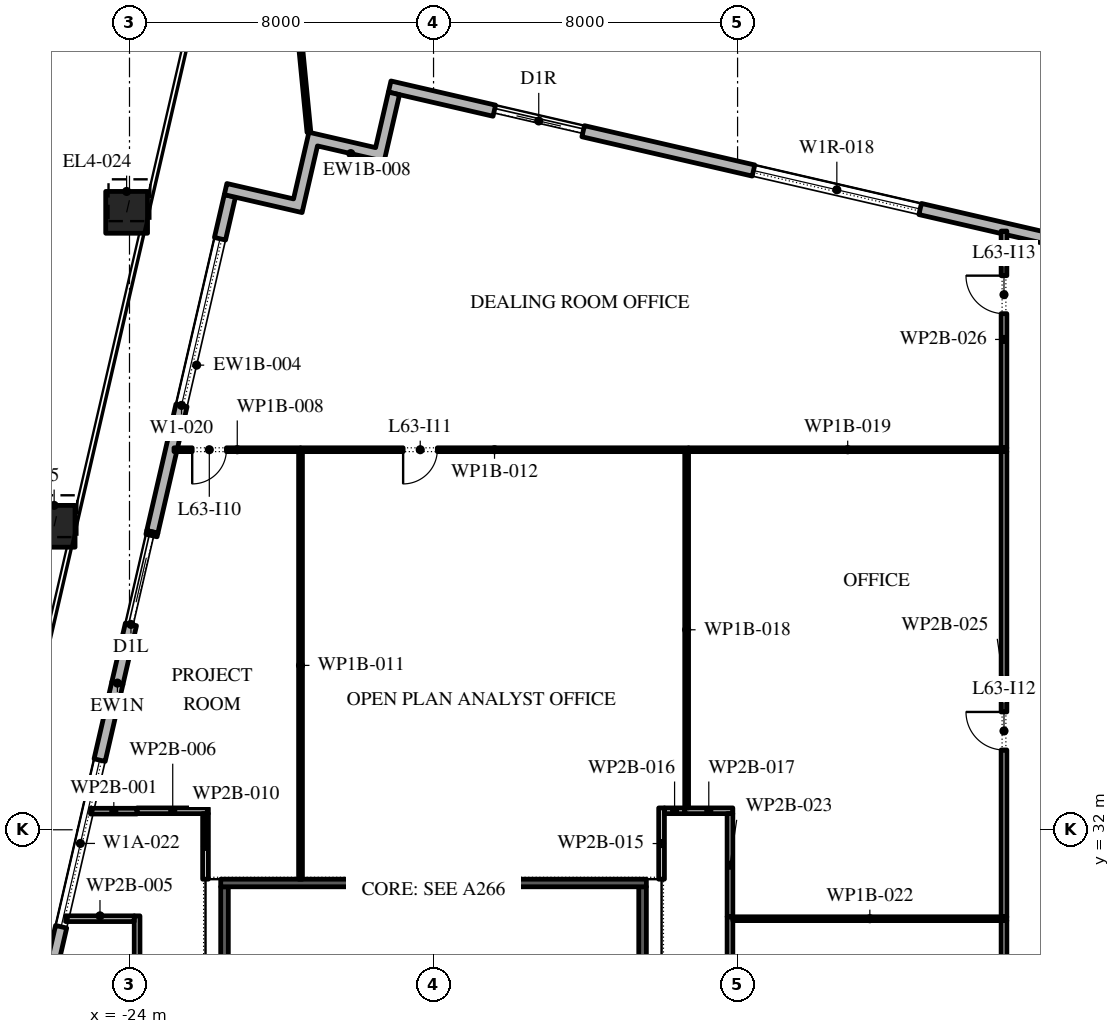
"""IFC4 building model, lengths in metres.
Left out: names, types, materials, properties, quantities, classifications, styles, units other than length and angle.
Written with IfcOpenShell. Run it as: python <this file> out.ifc"""

import sys

from ifc_helpers import new_model, si_unit, direction, frame, frame_2d, origin, origin_2d, place, context, subcontext, project, spatial, polyline, rectangle, outline, extrude, element, fill, save


model = new_model("IFC4")
c1 = context("Model", 3, precision=1e-05, world=origin(), true_north=direction((0.0, 1.0)))
c2 = subcontext(c1, "Body", "Model", "MODEL_VIEW")
j1 = project(units=[si_unit("LENGTHUNIT", "METRE"), si_unit("PLANEANGLEUNIT", "RADIAN")], contexts=[c1])
p1 = place(None, origin())
s1 = spatial("IfcSite", under=j1, at=p1, CompositionType="ELEMENT")
p2 = place(p1, origin())
s2 = spatial("IfcBuilding", under=s1, at=p2, CompositionType="ELEMENT")
p3 = place(p2, frame((0.0, 0.0, 289.2)))
s3 = spatial("IfcBuildingStorey", under=s2, at=p3, CompositionType="ELEMENT", Elevation=289.2)
p4 = place(p3, frame((-24.076, 48.246, 0.0), z_axis=(0.017444089556, 0.075687644385, 0.996978978829), x_axis=(-0.974454034257, 0.224587032398, 0.0)))
e1 = element("IfcColumn", 1, at=p4, inside=s3, PredefinedType="COLUMN", context=c2, shape_type="SweptSolid", body=[
    extrude(rectangle(XDim=1.1, YDim=1.1, at=origin_2d()), origin(), (0.0, 0.0, 1.0), 4.213),
])
p5 = place(p3, frame((-25.983, 39.985, 0.0), z_axis=(0.014617783326, 0.063169706518, 0.99789574034), x_axis=(-0.974255315496, 0.225447511024, 0.0)))
e2 = element("IfcColumn", 2, at=p5, inside=s3, PredefinedType="COLUMN", context=c2, shape_type="SweptSolid", body=[
    extrude(rectangle(XDim=1.1, YDim=1.1, at=origin_2d()), origin(), (0.0, 0.0, 1.0), 4.209),
])
p6 = place(p3, frame((29.616, 40.758, 0.0), z_axis=(0.0, 0.0, 1.0), x_axis=(-0.974370532314, 0.224949029246, 0.0)))
e3 = element("IfcWall", 3, at=p6, inside=s3, PredefinedType="STANDARD", context=c2, shape_type="SweptSolid", body=[
    extrude(rectangle(XDim=48.0, YDim=0.3, at=frame_2d((24.0, 0.0))), origin(), (0.0, 0.0, 1.0), 3.95),
])
p7 = place(p6, frame((1.625, 0.0, 0.45)))
e4 = element("IfcOpeningElement", 4, at=p7, cuts=e3, PredefinedType="OPENING", context=c2, shape_type="SweptSolid", body=[
    extrude(rectangle(XDim=4.5, YDim=2.475, at=frame_2d((2.25, 1.238))), frame((0.0, 0.16, 0.0), z_axis=(0.0, -1.0, 0.0), x_axis=(1.0, 0.0, 0.0)), (0.0, 0.0, 1.0), 0.32),
])
p8 = place(p6, frame((10.575, 0.0, 0.0)))
e5 = element("IfcOpeningElement", 5, at=p8, cuts=e3, PredefinedType="OPENING", context=c2, shape_type="SweptSolid", body=[
    extrude(rectangle(XDim=2.4, YDim=3.5, at=frame_2d((1.2, 1.75))), frame((0.0, 0.16, 0.0), z_axis=(0.0, -1.0, 0.0), x_axis=(1.0, 0.0, 0.0)), (0.0, 0.0, 1.0), 0.32),
])
p9 = place(p6, frame((17.575, 0.0, 0.45)))
e6 = element("IfcOpeningElement", 6, at=p9, cuts=e3, PredefinedType="OPENING", context=c2, shape_type="SweptSolid", body=[
    extrude(rectangle(XDim=4.5, YDim=2.4, at=frame_2d((2.25, 1.2))), frame((0.0, 0.16, 0.0), z_axis=(0.0, -1.0, 0.0), x_axis=(1.0, 0.0, 0.0)), (0.0, 0.0, 1.0), 0.32),
])
p10 = place(p6, frame((25.625, 0.0, 0.45)))
e7 = element("IfcOpeningElement", 7, at=p10, cuts=e3, PredefinedType="OPENING", context=c2, shape_type="SweptSolid", body=[
    extrude(rectangle(XDim=4.5, YDim=2.4, at=frame_2d((2.25, 1.2))), frame((0.0, 0.16, 0.0), z_axis=(0.0, -1.0, 0.0), x_axis=(1.0, 0.0, 0.0)), (0.0, 0.0, 1.0), 0.32),
])
p11 = place(p6, frame((33.675, 0.0, 0.45)))
e8 = element("IfcOpeningElement", 8, at=p11, cuts=e3, PredefinedType="OPENING", context=c2, shape_type="SweptSolid", body=[
    extrude(rectangle(XDim=4.5, YDim=2.4, at=frame_2d((2.25, 1.2))), frame((0.0, 0.16, 0.0), z_axis=(0.0, -1.0, 0.0), x_axis=(1.0, 0.0, 0.0)), (0.0, 0.0, 1.0), 0.32),
])
p12 = place(p6, frame((42.775, 0.0, 0.0)))
e9 = element("IfcOpeningElement", 9, at=p12, cuts=e3, PredefinedType="OPENING", context=c2, shape_type="SweptSolid", body=[
    extrude(rectangle(XDim=2.4, YDim=2.85, at=frame_2d((1.2, 1.425))), frame((0.0, 0.16, 0.0), z_axis=(0.0, -1.0, 0.0), x_axis=(1.0, 0.0, 0.0)), (0.0, 0.0, 1.0), 0.32),
])
p13 = place(p3, frame((-21.359, 48.678, 0.0), z_axis=(0.0, 0.0, 1.0), x_axis=(-0.224942060428, -0.974372141151, 0.0)))
e10 = element("IfcWall", 10, at=p13, inside=s3, PredefinedType="STANDARD", context=c2, shape_type="SweptSolid", body=[
    extrude(rectangle(XDim=9.071, YDim=0.3, at=frame_2d((4.536, 0.0))), origin(), (0.0, 0.0, 1.0), 3.95),
])
p14 = place(p13, frame((1.157, 0.0, 0.45)))
e11 = element("IfcOpeningElement", 11, at=p14, cuts=e10, PredefinedType="OPENING", context=c2, shape_type="SweptSolid", body=[
    extrude(rectangle(XDim=4.5, YDim=3.05, at=frame_2d((2.25, 1.525))), frame((0.0, 0.16, 0.0), z_axis=(0.0, -1.0, 0.0), x_axis=(1.0, 0.0, 0.0)), (0.0, 0.0, 1.0), 0.32),
])
p15 = place(p3, origin())
e12 = element("IfcWall", 12, at=p15, inside=s3, PredefinedType="STANDARD", context=c2, shape_type="SweptSolid", body=[
    extrude(outline(polyline([(-21.505, 48.712), (-21.438, 49.004), (-19.684, 48.599), (-19.279, 50.353), (-17.525, 49.948), (-17.188, 51.41), (-16.895, 51.342), (-17.3, 49.588), (-19.054, 49.993), (-19.459, 48.24), (-21.505, 48.712)])), origin(), (0.0, 0.0, 1.0), 3.95),
])
p16 = place(p3, frame((-19.279, 50.353, -0.05), z_axis=(0.0, 0.0, 1.0), x_axis=(-0.096971312153, 0.995287176959, 0.0)))
e13 = element("IfcWall", 13, at=p16, inside=s3, PredefinedType="STANDARD", context=c2, shape_type="SweptSolid", body=[
    extrude(rectangle(XDim=6.74, YDim=0.1, at=frame_2d((3.37, 0.0))), origin(), (0.0, 0.0, 1.0), 4.0),
])
p17 = place(p3, frame((-21.5, 25.75, 0.0), z_axis=(0.0, 0.0, 1.0), x_axis=(0.0, 1.0, 0.0)))
e14 = element("IfcWall", 14, at=p17, inside=s3, PredefinedType="SHEAR", context=c2, shape_type="SweptSolid", body=[
    extrude(rectangle(XDim=4.75, YDim=0.2, at=frame_2d((2.375, 0.0))), origin(), (0.0, 0.0, 1.0), 3.95),
])
p18 = place(p3, frame((-10.5, 25.75, 0.0), z_axis=(0.0, 0.0, 1.0), x_axis=(0.0, 1.0, 0.0)))
e15 = element("IfcWall", 15, at=p18, inside=s3, PredefinedType="SHEAR", context=c2, shape_type="SweptSolid", body=[
    extrude(rectangle(XDim=4.75, YDim=0.2, at=frame_2d((2.375, 0.0))), origin(), (0.0, 0.0, 1.0), 3.95),
])
p19 = place(p18, frame((1.925, 0.0, 0.0)))
e16 = element("IfcOpeningElement", 16, at=p19, cuts=e15, PredefinedType="OPENING", context=c2, shape_type="SweptSolid", body=[
    extrude(rectangle(XDim=0.9, YDim=2.1, at=frame_2d((0.45, 1.05))), frame((0.0, 0.11, 0.0), z_axis=(0.0, -1.0, 0.0), x_axis=(1.0, 0.0, 0.0)), (0.0, 0.0, 1.0), 0.22),
])
p20 = place(p3, frame((-21.6, 30.6, 0.0), z_axis=(0.0, 0.0, 1.0), x_axis=(1.0, 0.0, 0.0)))
e17 = element("IfcWall", 17, at=p20, inside=s3, PredefinedType="SHEAR", context=c2, shape_type="SweptSolid", body=[
    extrude(rectangle(XDim=11.2, YDim=0.2, at=frame_2d((5.6, 0.0))), origin(), (0.0, 0.0, 1.0), 3.95),
])
p21 = place(p3, frame((-25.025, 32.49, 0.0), z_axis=(0.0, 0.0, 1.0), x_axis=(1.0, 0.0, 0.0)))
e18 = element("IfcWall", 18, at=p21, inside=s3, PredefinedType="PARTITIONING", context=c2, shape_type="SweptSolid", body=[
    extrude(rectangle(XDim=1.225, YDim=0.15, at=frame_2d((0.612, 0.0))), origin(), (0.0, 0.0, 1.0), 3.95),
])
p22 = place(p3, frame((-23.8, 8.86, 0.0), z_axis=(0.0, 0.0, 1.0), x_axis=(0.0, 1.0, 0.0)))
e19 = element("IfcWall", 19, at=p22, inside=s3, PredefinedType="PARTITIONING", context=c2, shape_type="SweptSolid", body=[
    extrude(rectangle(XDim=20.875, YDim=0.15, at=frame_2d((10.438, 0.0))), origin(), (0.0, 0.0, 1.0), 3.95),
])
p23 = place(p22, frame((7.9, 0.0, 0.0)))
e20 = element("IfcOpeningElement", 20, at=p23, cuts=e19, PredefinedType="OPENING", context=c2, shape_type="SweptSolid", body=[
    extrude(rectangle(XDim=1.0, YDim=2.1, at=frame_2d((0.5, 1.05))), frame((0.0, 0.085, 0.0), z_axis=(0.0, -1.0, 0.0), x_axis=(1.0, 0.0, 0.0)), (0.0, 0.0, 1.0), 0.17),
])
p24 = place(p3, frame((-23.875, 29.66, 0.0), z_axis=(0.0, 0.0, 1.0), x_axis=(-1.0, 0.0, 0.0)))
e21 = element("IfcWall", 21, at=p24, inside=s3, PredefinedType="PARTITIONING", context=c2, shape_type="SweptSolid", body=[
    extrude(rectangle(XDim=1.803, YDim=0.15, at=frame_2d((0.901, 0.0))), origin(), (0.0, 0.0, 1.0), 3.95),
])
p25 = place(p3, frame((-23.8, 32.5, 0.0), z_axis=(0.0, 0.0, 1.0), x_axis=(1.0, 0.0, 0.0)))
e22 = element("IfcWall", 22, at=p25, inside=s3, PredefinedType="PARTITIONING", context=c2, shape_type="SweptSolid", body=[
    extrude(rectangle(XDim=1.875, YDim=0.15, at=frame_2d((0.938, 0.0))), origin(), (0.0, 0.0, 1.0), 3.95),
])
p26 = place(p3, frame((-22.829, 42.0, 0.0), z_axis=(0.0, 0.0, 1.0), x_axis=(1.0, 0.0, 0.0)))
e23 = element("IfcWall", 23, at=p26, inside=s3, PredefinedType="PARTITIONING", context=c2, shape_type="SweptSolid", body=[
    extrude(rectangle(XDim=3.329, YDim=0.1, at=frame_2d((1.665, 0.0))), origin(), (0.0, 0.0, 1.0), 3.95),
])
p27 = place(p26, frame((0.479, 0.0, 0.0)))
e24 = element("IfcOpeningElement", 24, at=p27, cuts=e23, PredefinedType="OPENING", context=c2, shape_type="SweptSolid", body=[
    extrude(rectangle(XDim=0.9, YDim=2.1, at=frame_2d((0.45, 1.05))), frame((0.0, 0.06, 0.0), z_axis=(0.0, -1.0, 0.0), x_axis=(1.0, 0.0, 0.0)), (0.0, 0.0, 1.0), 0.12),
])
p28 = place(p3, frame((-22.0, 32.425, 0.0), z_axis=(0.0, 0.0, 1.0), x_axis=(0.0, -1.0, 0.0)))
e25 = element("IfcWall", 25, at=p28, inside=s3, PredefinedType="PARTITIONING", context=c2, shape_type="SweptSolid", body=[
    extrude(rectangle(XDim=1.725, YDim=0.15, at=frame_2d((0.863, 0.0))), origin(), (0.0, 0.0, 1.0), 3.95),
])
p29 = place(p3, frame((-19.5, 41.95, 0.0), z_axis=(0.0, 0.0, 1.0), x_axis=(0.0, -1.0, 0.0)))
e26 = element("IfcWall", 26, at=p29, inside=s3, PredefinedType="PARTITIONING", context=c2, shape_type="SweptSolid", body=[
    extrude(rectangle(XDim=11.25, YDim=0.1, at=frame_2d((5.625, 0.0))), origin(), (0.0, 0.0, 1.0), 3.95),
])
p30 = place(p3, frame((-19.5, 42.0, 0.0), z_axis=(0.0, 0.0, 1.0), x_axis=(1.0, 0.0, 0.0)))
e27 = element("IfcWall", 27, at=p30, inside=s3, PredefinedType="PARTITIONING", context=c2, shape_type="SweptSolid", body=[
    extrude(rectangle(XDim=10.21, YDim=0.1, at=frame_2d((5.105, 0.0))), origin(), (0.0, 0.0, 1.0), 3.95),
])
p31 = place(p30, frame((2.7, 0.0, 0.0)))
e28 = element("IfcOpeningElement", 28, at=p31, cuts=e27, PredefinedType="OPENING", context=c2, shape_type="SweptSolid", body=[
    extrude(rectangle(XDim=0.9, YDim=2.1, at=frame_2d((0.45, 1.05))), frame((0.0, 0.06, 0.0), z_axis=(0.0, -1.0, 0.0), x_axis=(1.0, 0.0, 0.0)), (0.0, 0.0, 1.0), 0.12),
])
p32 = place(p3, frame((-10.0, 30.7, 0.0), z_axis=(0.0, 0.0, 1.0), x_axis=(0.0, 1.0, 0.0)))
e29 = element("IfcWall", 29, at=p32, inside=s3, PredefinedType="PARTITIONING", context=c2, shape_type="SweptSolid", body=[
    extrude(rectangle(XDim=1.875, YDim=0.15, at=frame_2d((0.938, 0.0))), origin(), (0.0, 0.0, 1.0), 3.95),
])
p33 = place(p3, frame((-9.925, 32.5, 0.0), z_axis=(0.0, 0.0, 1.0), x_axis=(1.0, 0.0, 0.0)))
e30 = element("IfcWall", 30, at=p33, inside=s3, PredefinedType="PARTITIONING", context=c2, shape_type="SweptSolid", body=[
    extrude(rectangle(XDim=0.535, YDim=0.15, at=frame_2d((0.268, 0.0))), origin(), (0.0, 0.0, 1.0), 3.95),
])
p34 = place(p3, frame((-9.39, 32.5, 0.0), z_axis=(0.0, 0.0, 1.0), x_axis=(1.0, 0.0, 0.0)))
e31 = element("IfcWall", 31, at=p34, inside=s3, PredefinedType="PARTITIONING", context=c2, shape_type="SweptSolid", body=[
    extrude(rectangle(XDim=1.265, YDim=0.15, at=frame_2d((0.632, 0.0))), origin(), (0.0, 0.0, 1.0), 3.95),
])
p35 = place(p3, frame((-9.34, 41.95, 0.0), z_axis=(0.0, 0.0, 1.0), x_axis=(0.0, -1.0, 0.0)))
e32 = element("IfcWall", 32, at=p35, inside=s3, PredefinedType="PARTITIONING", context=c2, shape_type="SweptSolid", body=[
    extrude(rectangle(XDim=9.375, YDim=0.1, at=frame_2d((4.688, 0.0))), origin(), (0.0, 0.0, 1.0), 3.95),
])
p36 = place(p3, frame((-9.29, 42.0, 0.0), z_axis=(0.0, 0.0, 1.0), x_axis=(1.0, 0.0, 0.0)))
e33 = element("IfcWall", 33, at=p36, inside=s3, PredefinedType="PARTITIONING", context=c2, shape_type="SweptSolid", body=[
    extrude(rectangle(XDim=8.375, YDim=0.1, at=frame_2d((4.188, 0.0))), origin(), (0.0, 0.0, 1.0), 3.95),
])
p37 = place(p3, frame((-8.2, 29.71, 0.0), z_axis=(0.0, 0.0, 1.0), x_axis=(0.0, -1.0, 0.0)))
e34 = element("IfcWall", 34, at=p37, inside=s3, PredefinedType="PARTITIONING", context=c2, shape_type="SweptSolid", body=[
    extrude(rectangle(XDim=10.635, YDim=0.15, at=frame_2d((5.317, 0.0))), origin(), (0.0, 0.0, 1.0), 3.95),
])
p38 = place(p37, frame((2.81, 0.0, 0.0)))
e35 = element("IfcOpeningElement", 35, at=p38, cuts=e34, PredefinedType="OPENING", context=c2, shape_type="SweptSolid", body=[
    extrude(rectangle(XDim=1.0, YDim=2.1, at=frame_2d((0.5, 1.05))), frame((0.0, 0.085, 0.0), z_axis=(0.0, -1.0, 0.0), x_axis=(1.0, 0.0, 0.0)), (0.0, 0.0, 1.0), 0.17),
])
p39 = place(p3, frame((-8.125, 29.66, 0.0), z_axis=(0.0, 0.0, 1.0), x_axis=(1.0, 0.0, 0.0)))
e36 = element("IfcWall", 36, at=p39, inside=s3, PredefinedType="PARTITIONING", context=c2, shape_type="SweptSolid", body=[
    extrude(rectangle(XDim=7.21, YDim=0.1, at=frame_2d((3.605, 0.0))), origin(), (0.0, 0.0, 1.0), 3.95),
])
p40 = place(p3, frame((-8.2, 32.425, 0.0), z_axis=(0.0, 0.0, 1.0), x_axis=(0.0, -1.0, 0.0)))
e37 = element("IfcWall", 37, at=p40, inside=s3, PredefinedType="PARTITIONING", context=c2, shape_type="SweptSolid", body=[
    extrude(rectangle(XDim=2.715, YDim=0.15, at=frame_2d((1.357, 0.0))), origin(), (0.0, 0.0, 1.0), 3.95),
])
p41 = place(p3, frame((-0.99, 19.075, 0.0), z_axis=(0.0, 0.0, 1.0), x_axis=(0.0, 1.0, 0.0)))
e38 = element("IfcWall", 38, at=p41, inside=s3, PredefinedType="PARTITIONING", context=c2, shape_type="SweptSolid", body=[
    extrude(rectangle(XDim=10.535, YDim=0.15, at=frame_2d((5.268, 0.0))), origin(), (0.0, 0.0, 1.0), 3.95),
])
p42 = place(p3, frame((-0.99, 29.71, 0.0), z_axis=(0.0, 0.0, 1.0), x_axis=(0.0, 1.0, 0.0)))
e39 = element("IfcWall", 39, at=p42, inside=s3, PredefinedType="PARTITIONING", context=c2, shape_type="SweptSolid", body=[
    extrude(rectangle(XDim=12.24, YDim=0.15, at=frame_2d((6.12, 0.0))), origin(), (0.0, 0.0, 1.0), 3.95),
])
p43 = place(p42, frame((4.39, 0.0, 0.0)))
e40 = element("IfcOpeningElement", 40, at=p43, cuts=e39, PredefinedType="OPENING", context=c2, shape_type="SweptSolid", body=[
    extrude(rectangle(XDim=1.0, YDim=2.1, at=frame_2d((0.5, 1.05))), frame((0.0, 0.085, 0.0), z_axis=(0.0, -1.0, 0.0), x_axis=(1.0, 0.0, 0.0)), (0.0, 0.0, 1.0), 0.17),
])
p44 = place(p3, frame((-0.99, 42.05, 0.0), z_axis=(0.0, 0.0, 1.0), x_axis=(0.0, 1.0, 0.0)))
e41 = element("IfcWall", 41, at=p44, inside=s3, PredefinedType="PARTITIONING", context=c2, shape_type="SweptSolid", body=[
    extrude(rectangle(XDim=5.703, YDim=0.15, at=frame_2d((2.852, 0.0))), origin(), (0.0, 0.0, 1.0), 3.95),
])
p45 = place(p44, frame((3.53, 0.0, 0.0)))
e42 = element("IfcOpeningElement", 42, at=p45, cuts=e41, PredefinedType="OPENING", context=c2, shape_type="SweptSolid", body=[
    extrude(rectangle(XDim=1.0, YDim=2.1, at=frame_2d((0.5, 1.05))), frame((0.0, 0.085, 0.0), z_axis=(0.0, -1.0, 0.0), x_axis=(1.0, 0.0, 0.0)), (0.0, 0.0, 1.0), 0.17),
])
p46 = place(p3, frame((-23.399, 39.839, 0.0), z_axis=(0.0, 0.0, 1.0), x_axis=(-0.224973000371, -0.974364997885, 0.0)))
e43 = element("IfcWall", 43, at=p46, inside=s3, PredefinedType="STANDARD", context=c2, shape_type="SweptSolid", body=[
    extrude(rectangle(XDim=4.085, YDim=0.3, at=frame_2d((2.042, 0.0))), origin(), (0.0, 0.0, 1.0), 3.188),
])
p47 = place(p46, frame((0.1, 0.0, 0.0)))
e44 = element("IfcOpeningElement", 44, at=p47, cuts=e43, PredefinedType="OPENING", context=c2, shape_type="SweptSolid", body=[
    extrude(rectangle(XDim=2.4, YDim=3.05, at=frame_2d((1.2, 1.525))), frame((0.0, 0.16, 0.0), z_axis=(0.0, -1.0, 0.0), x_axis=(1.0, 0.0, 0.0)), (0.0, 0.0, 1.0), 0.32),
])
p48 = place(p3, frame((-24.318, 35.859, 0.0), z_axis=(0.0, 0.0, 1.0), x_axis=(-0.224948304833, -0.974370699556, 0.0)))
e45 = element("IfcWall", 45, at=p48, inside=s3, PredefinedType="STANDARD", context=c2, shape_type="SweptSolid", body=[
    extrude(rectangle(XDim=36.344, YDim=0.3, at=frame_2d((18.172, 0.0))), origin(), (0.0, 0.0, 1.0), 3.95),
])
p49 = place(p48, frame((2.08, 0.0, 0.45)))
e46 = element("IfcOpeningElement", 46, at=p49, cuts=e45, PredefinedType="OPENING", context=c2, shape_type="SweptSolid", body=[
    extrude(rectangle(XDim=4.5, YDim=3.0, at=frame_2d((2.25, 1.5))), frame((0.0, 0.16, 0.0), z_axis=(0.0, -1.0, 0.0), x_axis=(1.0, 0.0, 0.0)), (0.0, 0.0, 1.0), 0.32),
])
p50 = place(p48, frame((9.194, 0.0, 0.45)))
e47 = element("IfcOpeningElement", 47, at=p50, cuts=e45, PredefinedType="OPENING", context=c2, shape_type="SweptSolid", body=[
    extrude(rectangle(XDim=4.5, YDim=3.0, at=frame_2d((2.25, 1.5))), frame((0.0, 0.16, 0.0), z_axis=(0.0, -1.0, 0.0), x_axis=(1.0, 0.0, 0.0)), (0.0, 0.0, 1.0), 0.32),
])
p51 = place(p48, frame((16.308, 0.0, 0.45)))
e48 = element("IfcOpeningElement", 48, at=p51, cuts=e45, PredefinedType="OPENING", context=c2, shape_type="SweptSolid", body=[
    extrude(rectangle(XDim=4.5, YDim=3.05, at=frame_2d((2.25, 1.525))), frame((0.0, 0.16, 0.0), z_axis=(0.0, -1.0, 0.0), x_axis=(1.0, 0.0, 0.0)), (0.0, 0.0, 1.0), 0.32),
])
p52 = place(p48, frame((24.472, 0.0, 0.0)))
e49 = element("IfcOpeningElement", 49, at=p52, cuts=e45, PredefinedType="OPENING", context=c2, shape_type="SweptSolid", body=[
    extrude(rectangle(XDim=2.4, YDim=3.275, at=frame_2d((1.2, 1.637))), frame((0.0, 0.16, 0.0), z_axis=(0.0, -1.0, 0.0), x_axis=(1.0, 0.0, 0.0)), (0.0, 0.0, 1.0), 0.32),
])
p53 = place(p48, frame((30.537, 0.0, 0.45)))
e50 = element("IfcOpeningElement", 50, at=p53, cuts=e45, PredefinedType="OPENING", context=c2, shape_type="SweptSolid", body=[
    extrude(rectangle(XDim=4.5, YDim=2.775, at=frame_2d((2.25, 1.387))), frame((0.0, 0.16, 0.0), z_axis=(0.0, -1.0, 0.0), x_axis=(1.0, 0.0, 0.0)), (0.0, 0.0, 1.0), 0.32),
])
p54 = place(p11, origin())
e51 = element("IfcWindow", 51, at=p54, inside=s3, PartitioningType="DOUBLE_PANEL_VERTICAL", PredefinedType="WINDOW", context=c2, shape_type="SweptSolid", body=[
    extrude(rectangle(XDim=4.5, YDim=2.4, at=frame_2d((2.25, 1.2))), frame((0.0, 0.03, 0.0), z_axis=(0.0, -1.0, 0.0), x_axis=(1.0, 0.0, 0.0)), (0.0, 0.0, 1.0), 0.06),
])
fill(e8, e51)
p55 = place(p12, origin())
e52 = element("IfcDoor", 52, at=p55, inside=s3, OperationType="DOUBLE_DOOR_SLIDING", PredefinedType="DOOR", context=c2, shape_type="SweptSolid", body=[
    extrude(rectangle(XDim=2.4, YDim=2.85, at=frame_2d((1.2, 1.425))), frame((0.0, 0.025, 0.0), z_axis=(0.0, -1.0, 0.0), x_axis=(1.0, 0.0, 0.0)), (0.0, 0.0, 1.0), 0.05),
])
fill(e9, e52)
p56 = place(p14, origin())
e53 = element("IfcWindow", 53, at=p56, inside=s3, PartitioningType="DOUBLE_PANEL_VERTICAL", PredefinedType="WINDOW", context=c2, shape_type="SweptSolid", body=[
    extrude(rectangle(XDim=4.5, YDim=3.05, at=frame_2d((2.25, 1.525))), frame((0.0, 0.03, 0.0), z_axis=(0.0, -1.0, 0.0), x_axis=(1.0, 0.0, 0.0)), (0.0, 0.0, 1.0), 0.06),
])
fill(e11, e53)
p57 = place(p47, origin())
e54 = element("IfcDoor", 54, at=p57, inside=s3, OperationType="DOUBLE_DOOR_SLIDING", PredefinedType="DOOR", context=c2, shape_type="SweptSolid", body=[
    extrude(rectangle(XDim=2.4, YDim=3.05, at=frame_2d((1.2, 1.525))), frame((0.0, 0.025, 0.0), z_axis=(0.0, -1.0, 0.0), x_axis=(1.0, 0.0, 0.0)), (0.0, 0.0, 1.0), 0.05),
])
fill(e44, e54)
p58 = place(p49, origin())
e55 = element("IfcWindow", 55, at=p58, inside=s3, PartitioningType="DOUBLE_PANEL_VERTICAL", PredefinedType="WINDOW", context=c2, shape_type="SweptSolid", body=[
    extrude(rectangle(XDim=4.5, YDim=3.0, at=frame_2d((2.25, 1.5))), frame((0.0, 0.03, 0.0), z_axis=(0.0, -1.0, 0.0), x_axis=(1.0, 0.0, 0.0)), (0.0, 0.0, 1.0), 0.06),
])
fill(e46, e55)
p59 = place(p27, frame((0.9, 0.0, 0.0), z_axis=(0.0, 0.0, 1.0), x_axis=(-1.0, 0.0, 0.0)))
e56 = element("IfcDoor", 56, at=p59, inside=s3, OperationType="SINGLE_SWING_LEFT", PredefinedType="DOOR", context=c2, shape_type="SweptSolid", body=[
    extrude(rectangle(XDim=0.9, YDim=2.1, at=frame_2d((0.45, 1.05))), frame((0.0, 0.025, 0.0), z_axis=(0.0, -1.0, 0.0), x_axis=(1.0, 0.0, 0.0)), (0.0, 0.0, 1.0), 0.05),
])
fill(e24, e56)
p60 = place(p31, frame((0.9, 0.0, 0.0), z_axis=(0.0, 0.0, 1.0), x_axis=(-1.0, 0.0, 0.0)))
e57 = element("IfcDoor", 57, at=p60, inside=s3, OperationType="SINGLE_SWING_LEFT", PredefinedType="DOOR", context=c2, shape_type="SweptSolid", body=[
    extrude(rectangle(XDim=0.9, YDim=2.1, at=frame_2d((0.45, 1.05))), frame((0.0, 0.025, 0.0), z_axis=(0.0, -1.0, 0.0), x_axis=(1.0, 0.0, 0.0)), (0.0, 0.0, 1.0), 0.05),
])
fill(e28, e57)
p61 = place(p43, origin())
e58 = element("IfcDoor", 58, at=p61, inside=s3, OperationType="SINGLE_SWING_LEFT", PredefinedType="DOOR", context=c2, shape_type="SweptSolid", body=[
    extrude(rectangle(XDim=1.0, YDim=2.1, at=frame_2d((0.5, 1.05))), frame((0.0, 0.025, 0.0), z_axis=(0.0, -1.0, 0.0), x_axis=(1.0, 0.0, 0.0)), (0.0, 0.0, 1.0), 0.05),
])
fill(e40, e58)
p62 = place(p45, origin())
e59 = element("IfcDoor", 59, at=p62, inside=s3, OperationType="SINGLE_SWING_LEFT", PredefinedType="DOOR", context=c2, shape_type="SweptSolid", body=[
    extrude(rectangle(XDim=1.0, YDim=2.1, at=frame_2d((0.5, 1.05))), frame((0.0, 0.025, 0.0), z_axis=(0.0, -1.0, 0.0), x_axis=(1.0, 0.0, 0.0)), (0.0, 0.0, 1.0), 0.05),
])
fill(e42, e59)
save(model, sys.argv[1])
